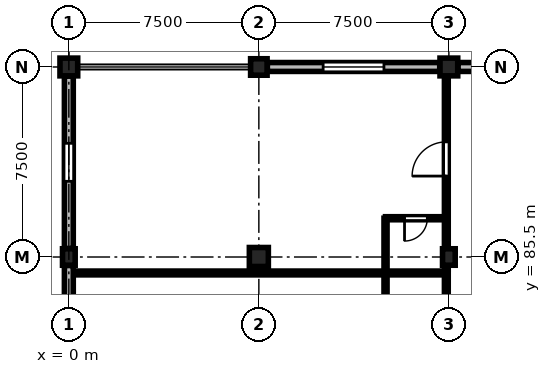
"""IFC4 building model, lengths in metres.
Left out: names, types, materials, properties, quantities, classifications, styles, units other than length and angle.
Written with IfcOpenShell. Run it as: python <this file> out.ifc"""

import sys

from ifc_helpers import new_model, si_unit, direction, frame, frame_2d, origin, origin_2d, place, context, subcontext, project, spatial, rectangle, extrude, element, fill, save


model = new_model("IFC4")
c1 = context("Model", 3, precision=1e-05, world=origin(), true_north=direction((0.0, 1.0)))
c2 = subcontext(c1, "Body", "Model", "MODEL_VIEW")
j1 = project(units=[si_unit("LENGTHUNIT", "METRE"), si_unit("PLANEANGLEUNIT", "RADIAN")], contexts=[c1])
p1 = place(None, origin())
s1 = spatial("IfcSite", under=j1, at=p1, CompositionType="ELEMENT")
p2 = place(p1, origin())
s2 = spatial("IfcBuilding", under=s1, at=p2, CompositionType="ELEMENT")
p3 = place(p2, frame((0.0, 0.0, 9.3)))
s3 = spatial("IfcBuildingStorey", under=s2, at=p3, CompositionType="ELEMENT", Elevation=9.3)
p4 = place(p3, frame((0.0, 85.5, 0.0), z_axis=(0.0, 0.0, 1.0), x_axis=(1.0, 0.0, 0.0)))
e1 = element("IfcColumn", 1, at=p4, inside=s3, PredefinedType="COLUMN", context=c2, shape_type="SweptSolid", body=[
    extrude(rectangle(XDim=0.5, YDim=0.65, at=origin_2d()), origin(), (0.0, 0.0, 1.0), 4.8),
])
p5 = place(p3, frame((0.0, 93.0, 0.0), z_axis=(0.0, 0.0, 1.0), x_axis=(1.0, 0.0, 0.0)))
e2 = element("IfcColumn", 2, at=p5, inside=s3, PredefinedType="COLUMN", context=c2, shape_type="SweptSolid", body=[
    extrude(rectangle(XDim=0.7, YDim=0.7, at=origin_2d()), origin(), (0.0, 0.0, 1.0), 4.8),
])
p6 = place(p3, frame((7.5, 85.5, 0.0), z_axis=(0.0, 0.0, 1.0), x_axis=(1.0, 0.0, 0.0)))
e3 = element("IfcColumn", 3, at=p6, inside=s3, PredefinedType="COLUMN", context=c2, shape_type="SweptSolid", body=[
    extrude(rectangle(XDim=0.75, YDim=0.75, at=origin_2d()), origin(), (0.0, 0.0, 1.0), 4.8),
])
p7 = place(p3, frame((7.5, 93.0, 0.0), z_axis=(0.0, 0.0, 1.0), x_axis=(1.0, 0.0, 0.0)))
e4 = element("IfcColumn", 4, at=p7, inside=s3, PredefinedType="COLUMN", context=c2, shape_type="SweptSolid", body=[
    extrude(rectangle(XDim=0.65, YDim=0.65, at=origin_2d()), origin(), (0.0, 0.0, 1.0), 4.8),
])
p8 = place(p3, frame((15.0, 85.5, 0.0), z_axis=(0.0, 0.0, 1.0), x_axis=(1.0, 0.0, 0.0)))
e5 = element("IfcColumn", 5, at=p8, inside=s3, PredefinedType="COLUMN", context=c2, shape_type="SweptSolid", body=[
    extrude(rectangle(XDim=0.5, YDim=0.65, at=origin_2d()), origin(), (0.0, 0.0, 1.0), 4.8),
])
p9 = place(p3, frame((15.0, 93.0, 0.0), z_axis=(0.0, 0.0, 1.0), x_axis=(1.0, 0.0, 0.0)))
e6 = element("IfcColumn", 6, at=p9, inside=s3, PredefinedType="COLUMN", context=c2, shape_type="SweptSolid", body=[
    extrude(rectangle(XDim=0.7, YDim=0.7, at=origin_2d()), origin(), (0.0, 0.0, 1.0), 4.8),
])
p10 = place(p3, frame((0.0, 76.91, 0.0), z_axis=(0.0, 0.0, 1.0), x_axis=(0.0, 1.0, 0.0)))
e7 = element("IfcWall", 7, at=p10, inside=s3, PredefinedType="STANDARD", context=c2, shape_type="SweptSolid", body=[
    extrude(rectangle(XDim=8.255, YDim=0.35, at=frame_2d((4.127, 0.0))), origin(), (0.0, 0.0, 1.0), 4.0),
])
p11 = place(p10, frame((3.228, 0.0, 0.9)))
e8 = element("IfcOpeningElement", 8, at=p11, cuts=e7, PredefinedType="OPENING", context=c2, shape_type="SweptSolid", body=[
    extrude(rectangle(XDim=1.8, YDim=2.4, at=frame_2d((0.9, 1.2))), frame((0.0, 0.185, 0.0), z_axis=(0.0, -1.0, 0.0), x_axis=(1.0, 0.0, 0.0)), (0.0, 0.0, 1.0), 0.37),
])
p12 = place(p3, frame((0.0, 85.835, 0.0), z_axis=(0.0, 0.0, 1.0), x_axis=(0.0, 1.0, 0.0)))
e9 = element("IfcWall", 9, at=p12, inside=s3, PredefinedType="STANDARD", context=c2, shape_type="SweptSolid", body=[
    extrude(rectangle(XDim=6.805, YDim=0.35, at=frame_2d((3.402, 0.0))), origin(), (0.0, 0.0, 1.0), 3.95),
])
p13 = place(p12, frame((2.653, 0.0, 0.9)))
e10 = element("IfcOpeningElement", 10, at=p13, cuts=e9, PredefinedType="OPENING", context=c2, shape_type="SweptSolid", body=[
    extrude(rectangle(XDim=1.5, YDim=2.4, at=frame_2d((0.75, 1.2))), frame((0.0, 0.185, 0.0), z_axis=(0.0, -1.0, 0.0), x_axis=(1.0, 0.0, 0.0)), (0.0, 0.0, 1.0), 0.37),
])
p14 = place(p3, frame((7.835, 93.0, 0.0), z_axis=(0.0, 0.0, 1.0), x_axis=(1.0, 0.0, 0.0)))
e11 = element("IfcWall", 11, at=p14, inside=s3, PredefinedType="STANDARD", context=c2, shape_type="SweptSolid", body=[
    extrude(rectangle(XDim=6.805, YDim=0.35, at=frame_2d((3.402, 0.0))), origin(), (0.0, 0.0, 1.0), 3.95),
])
p15 = place(p14, frame((2.202, 0.0, 0.9)))
e12 = element("IfcOpeningElement", 12, at=p15, cuts=e11, PredefinedType="OPENING", context=c2, shape_type="SweptSolid", body=[
    extrude(rectangle(XDim=2.4, YDim=2.5, at=frame_2d((1.2, 1.25))), frame((0.0, 0.185, 0.0), z_axis=(0.0, -1.0, 0.0), x_axis=(1.0, 0.0, 0.0)), (0.0, 0.0, 1.0), 0.37),
])
p16 = place(p3, frame((15.36, 93.0, 0.0), z_axis=(0.0, 0.0, 1.0), x_axis=(1.0, 0.0, 0.0)))
e13 = element("IfcWall", 13, at=p16, inside=s3, PredefinedType="STANDARD", context=c2, shape_type="SweptSolid", body=[
    extrude(rectangle(XDim=6.805, YDim=0.35, at=frame_2d((3.402, 0.0))), origin(), (0.0, 0.0, 1.0), 3.95),
])
p17 = place(p16, frame((2.502, 0.0, 0.9)))
e14 = element("IfcOpeningElement", 14, at=p17, cuts=e13, PredefinedType="OPENING", context=c2, shape_type="SweptSolid", body=[
    extrude(rectangle(XDim=1.8, YDim=2.1, at=frame_2d((0.9, 1.05))), frame((0.0, 0.185, 0.0), z_axis=(0.0, -1.0, 0.0), x_axis=(1.0, 0.0, 0.0)), (0.0, 0.0, 1.0), 0.37),
])
p18 = place(p3, frame((14.9, 77.33, 0.0), z_axis=(0.0, 0.0, 1.0), x_axis=(0.0, 1.0, 0.0)))
e15 = element("IfcWall", 15, at=p18, inside=s3, PredefinedType="PARTITIONING", context=c2, shape_type="SweptSolid", body=[
    extrude(rectangle(XDim=7.54, YDim=0.15, at=frame_2d((3.77, 0.0))), origin(), (0.0, 0.0, 1.0), 3.835),
])
p19 = place(p18, frame((3.045, 0.0, 0.0)))
e16 = element("IfcOpeningElement", 16, at=p19, cuts=e15, PredefinedType="OPENING", context=c2, shape_type="SweptSolid", body=[
    extrude(rectangle(XDim=1.45, YDim=2.3, at=frame_2d((0.725, 1.15))), frame((0.0, 0.085, 0.0), z_axis=(0.0, -1.0, 0.0), x_axis=(1.0, 0.0, 0.0)), (0.0, 0.0, 1.0), 0.17),
])
p20 = place(p3, frame((12.5, 82.87, 0.0), z_axis=(0.0, 0.0, 1.0), x_axis=(0.0, 1.0, 0.0)))
e17 = element("IfcWall", 17, at=p20, inside=s3, PredefinedType="PARTITIONING", context=c2, shape_type="SweptSolid", body=[
    extrude(rectangle(XDim=2.0, YDim=0.12, at=frame_2d((1.0, 0.0))), origin(), (0.0, 0.0, 1.0), 4.535),
])
p21 = place(p3, frame((14.9, 85.03, 0.0), z_axis=(0.0, 0.0, 1.0), x_axis=(0.0, 1.0, 0.0)))
e18 = element("IfcWall", 18, at=p21, inside=s3, PredefinedType="PARTITIONING", context=c2, shape_type="SweptSolid", body=[
    extrude(rectangle(XDim=7.54, YDim=0.15, at=frame_2d((3.77, 0.0))), origin(), (0.0, 0.0, 1.0), 3.835),
])
p22 = place(p21, frame((3.664, 0.0, 0.0)))
e19 = element("IfcOpeningElement", 19, at=p22, cuts=e18, PredefinedType="OPENING", context=c2, shape_type="SweptSolid", body=[
    extrude(rectangle(XDim=1.35, YDim=2.25, at=frame_2d((0.675, 1.125))), frame((0.0, 0.085, 0.0), z_axis=(0.0, -1.0, 0.0), x_axis=(1.0, 0.0, 0.0)), (0.0, 0.0, 1.0), 0.17),
])
p23 = place(p3, frame((14.9, 87.03, 0.0), z_axis=(0.0, 0.0, 1.0), x_axis=(-1.0, 0.0, 0.0)))
e20 = element("IfcWall", 20, at=p23, inside=s3, PredefinedType="PARTITIONING", context=c2, shape_type="SweptSolid", body=[
    extrude(rectangle(XDim=2.4, YDim=0.12, at=frame_2d((1.2, 0.0))), origin(), (0.0, 0.0, 1.0), 4.535),
])
p24 = place(p23, frame((0.75, 0.0, 0.0)))
e21 = element("IfcOpeningElement", 21, at=p24, cuts=e20, PredefinedType="OPENING", context=c2, shape_type="SweptSolid", body=[
    extrude(rectangle(XDim=0.9, YDim=2.1, at=frame_2d((0.45, 1.05))), frame((0.0, 0.07, 0.0), z_axis=(0.0, -1.0, 0.0), x_axis=(1.0, 0.0, 0.0)), (0.0, 0.0, 1.0), 0.14),
])
p25 = place(p3, frame((12.5, 85.03, 0.0), z_axis=(0.0, 0.0, 1.0), x_axis=(0.0, 1.0, 0.0)))
e22 = element("IfcWall", 22, at=p25, inside=s3, PredefinedType="PARTITIONING", context=c2, shape_type="SweptSolid", body=[
    extrude(rectangle(XDim=2.0, YDim=0.12, at=frame_2d((1.0, 0.0))), origin(), (0.0, 0.0, 1.0), 4.535),
])
p26 = place(p3, frame((0.35, 84.87, 0.0), z_axis=(0.0, 0.0, 1.0), x_axis=(1.0, 0.0, 0.0)))
e23 = element("IfcWall", 23, at=p26, inside=s3, PredefinedType="PARTITIONING", context=c2, shape_type="SweptSolid", body=[
    extrude(rectangle(XDim=14.55, YDim=0.15, at=frame_2d((7.275, 0.0))), origin(), (0.0, 0.0, 1.0), 4.535),
])
p27 = place(p13, origin())
e24 = element("IfcWindow", 24, at=p27, inside=s3, PartitioningType="SINGLE_PANEL", PredefinedType="WINDOW", context=c2, shape_type="SweptSolid", body=[
    extrude(rectangle(XDim=1.5, YDim=2.4, at=frame_2d((0.75, 1.2))), frame((0.0, 0.03, 0.0), z_axis=(0.0, -1.0, 0.0), x_axis=(1.0, 0.0, 0.0)), (0.0, 0.0, 1.0), 0.06),
])
fill(e10, e24)
p28 = place(p15, origin())
e25 = element("IfcWindow", 25, at=p28, inside=s3, PartitioningType="SINGLE_PANEL", PredefinedType="WINDOW", context=c2, shape_type="SweptSolid", body=[
    extrude(rectangle(XDim=2.4, YDim=2.5, at=frame_2d((1.2, 1.25))), frame((0.0, 0.03, 0.0), z_axis=(0.0, -1.0, 0.0), x_axis=(1.0, 0.0, 0.0)), (0.0, 0.0, 1.0), 0.06),
])
fill(e12, e25)
p29 = place(p22, origin())
e26 = element("IfcDoor", 26, at=p29, inside=s3, OperationType="SINGLE_SWING_LEFT", PredefinedType="DOOR", context=c2, shape_type="SweptSolid", body=[
    extrude(rectangle(XDim=1.35, YDim=2.25, at=frame_2d((0.675, 1.125))), frame((0.0, 0.025, 0.0), z_axis=(0.0, -1.0, 0.0), x_axis=(1.0, 0.0, 0.0)), (0.0, 0.0, 1.0), 0.05),
])
fill(e19, e26)
p30 = place(p24, origin())
e27 = element("IfcDoor", 27, at=p30, inside=s3, OperationType="SINGLE_SWING_RIGHT", PredefinedType="DOOR", context=c2, shape_type="SweptSolid", body=[
    extrude(rectangle(XDim=0.9, YDim=2.1, at=frame_2d((0.45, 1.05))), frame((0.0, 0.025, 0.0), z_axis=(0.0, -1.0, 0.0), x_axis=(1.0, 0.0, 0.0)), (0.0, 0.0, 1.0), 0.05),
])
fill(e21, e27)
save(model, sys.argv[1])
